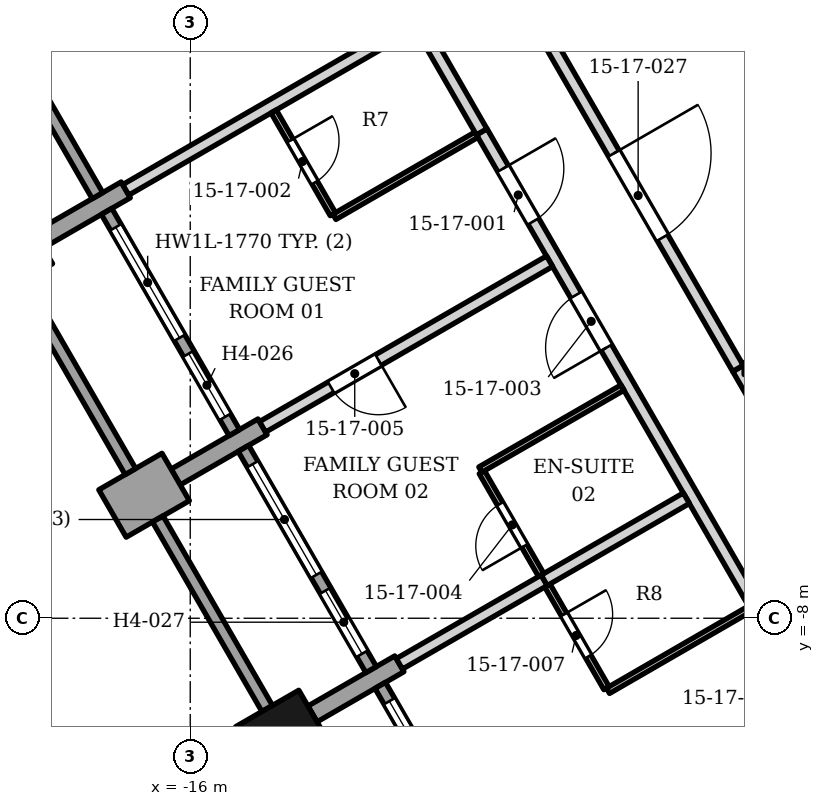
"""IFC4 building model, lengths in metres.
Left out: names, types, materials, properties, quantities, classifications, styles, units other than length and angle.
Written with IfcOpenShell. Run it as: python <this file> out.ifc"""

import sys

from ifc_helpers import new_model, si_unit, direction, frame, frame_2d, origin, origin_2d, place, context, subcontext, project, spatial, rectangle, extrude, element, fill, save


model = new_model("IFC4")
c1 = context("Model", 3, precision=1e-05, world=origin(), true_north=direction((0.0, 1.0)))
c2 = subcontext(c1, "Body", "Model", "MODEL_VIEW")
j1 = project(units=[si_unit("LENGTHUNIT", "METRE"), si_unit("PLANEANGLEUNIT", "RADIAN")], contexts=[c1])
p1 = place(None, origin())
s1 = spatial("IfcSite", under=j1, at=p1, CompositionType="ELEMENT")
p2 = place(p1, origin())
s2 = spatial("IfcBuilding", under=s1, at=p2, CompositionType="ELEMENT")
p3 = place(p2, frame((0.0, 0.0, 76.6)))
s3 = spatial("IfcBuildingStorey", under=s2, at=p3, CompositionType="ELEMENT", Elevation=76.6)
for number, where, z_axis, x_axis in (
    (1, (-19.009, -2.08, 0.0), (0.0, 0.0, 1.0), (0.5, -0.866, 0.0)),
    (2, (-14.509, -9.874, 0.0), (0.0, 0.0, 1.0), (0.5, -0.866, 0.0)),
):
    element("IfcColumn", number, at=place(p3, frame(where, z_axis=z_axis, x_axis=x_axis)), inside=s3, PredefinedType="COLUMN", context=c2, shape_type="SweptSolid", body=[
        extrude(rectangle(XDim=0.9, YDim=1.2, at=origin_2d()), origin(), (0.0, 0.0, 1.0), 3.4),
    ])
p4 = place(p3, frame((-18.49, -1.78, 0.0), z_axis=(0.0, 0.0, 1.0), x_axis=(0.866040211805, 0.499974350878, 0.0)))
e3 = element("IfcWall", 3, at=p4, inside=s3, PredefinedType="SOLIDWALL", context=c2, shape_type="SweptSolid", body=[
    extrude(rectangle(XDim=1.65, YDim=0.3, at=frame_2d((0.825, 0.0))), origin(), (0.0, 0.0, 1.0), 2.65),
])
p5 = place(p3, frame((-17.279, -6.277, 0.0), z_axis=(0.0, 0.0, 1.0), x_axis=(0.866094119867, 0.499880961361, 0.0)))
e4 = element("IfcWall", 4, at=p5, inside=s3, PredefinedType="SOLIDWALL", context=c2, shape_type="SweptSolid", body=[
    extrude(rectangle(XDim=1.2, YDim=0.9, at=frame_2d((0.6, 0.0))), origin(), (0.0, 0.0, 1.0), 2.63),
])
p6 = place(p3, frame((-16.24, -5.677, 0.0), z_axis=(0.0, 0.0, 1.0), x_axis=(0.866040211805, 0.499974350878, 0.0)))
e5 = element("IfcWall", 5, at=p6, inside=s3, PredefinedType="SOLIDWALL", context=c2, shape_type="SweptSolid", body=[
    extrude(rectangle(XDim=1.65, YDim=0.3, at=frame_2d((0.825, 0.0))), origin(), (0.0, 0.0, 1.0), 2.473),
])
p7 = place(p3, frame((-12.561, -8.749, 0.0), z_axis=(0.0, 0.0, 1.0), x_axis=(-0.866003217194, -0.500038426333, 0.0)))
e6 = element("IfcWall", 6, at=p7, inside=s3, PredefinedType="SOLIDWALL", context=c2, shape_type="SweptSolid", body=[
    extrude(rectangle(XDim=1.65, YDim=0.3, at=frame_2d((0.825, 0.0))), origin(), (0.0, 0.0, 1.0), 2.242),
])
p8 = place(p3, frame((-19.625, 2.587, 0.0), z_axis=(0.0, 0.0, 1.0), x_axis=(0.499958946799, -0.866049104564, 0.0)))
e7 = element("IfcWall", 7, at=p8, inside=s3, PredefinedType="ELEMENTEDWALL", context=c2, shape_type="SweptSolid", body=[
    extrude(rectangle(XDim=4.2, YDim=0.2, at=frame_2d((2.1, 0.0))), origin(), (0.0, 0.0, 1.0), 2.65),
])
p9 = place(p3, frame((-18.784, -2.47, 0.0), z_axis=(0.0, 0.0, 1.0), x_axis=(0.500012057535, -0.866018442252, 0.0)))
e8 = element("IfcWall", 8, at=p9, inside=s3, PredefinedType="SOLIDWALL", context=c2, shape_type="SweptSolid", body=[
    extrude(rectangle(XDim=3.6, YDim=0.2, at=frame_2d((1.8, 0.0))), origin(), (0.0, 0.0, 1.0), 2.63),
])
p10 = place(p3, frame((-17.375, -1.31, 0.0), z_axis=(0.0, 0.0, 1.0), x_axis=(0.49998411664, -0.866034573852, 0.0)))
e9 = element("IfcWall", 9, at=p10, inside=s3, PredefinedType="ELEMENTEDWALL", context=c2, shape_type="SweptSolid", body=[
    extrude(rectangle(XDim=4.2, YDim=0.2, at=frame_2d((2.1, 0.0))), origin(), (0.0, 0.0, 1.0), 2.473),
])
p11 = place(p10, frame((0.3, 0.0, 0.6)))
e10 = element("IfcOpeningElement", 10, at=p11, cuts=e9, PredefinedType="OPENING", context=c2, shape_type="SweptSolid", body=[
    extrude(rectangle(XDim=2.1, YDim=1.77, at=frame_2d((1.05, 0.885))), frame((0.0, 0.11, 0.0), z_axis=(0.0, -1.0, 0.0), x_axis=(1.0, 0.0, 0.0)), (0.0, 0.0, 1.0), 0.22),
])
p12 = place(p10, frame((2.7, 0.0, 0.0)))
e11 = element("IfcOpeningElement", 11, at=p12, cuts=e9, PredefinedType="OPENING", context=c2, shape_type="SweptSolid", body=[
    extrude(rectangle(XDim=1.2, YDim=2.37, at=frame_2d((0.6, 1.185))), frame((0.0, 0.11, 0.0), z_axis=(0.0, -1.0, 0.0), x_axis=(1.0, 0.0, 0.0)), (0.0, 0.0, 1.0), 0.22),
])
p13 = place(p3, frame((-16.534, -6.367, 0.0), z_axis=(0.0, 0.0, 1.0), x_axis=(0.500012057535, -0.866018442252, 0.0)))
e12 = element("IfcWall", 12, at=p13, inside=s3, PredefinedType="SOLIDWALL", context=c2, shape_type="SweptSolid", body=[
    extrude(rectangle(XDim=3.6, YDim=0.2, at=frame_2d((1.8, 0.0))), origin(), (0.0, 0.0, 1.0), 2.63),
])
p14 = place(p3, frame((-15.125, -5.207, 0.0), z_axis=(0.0, 0.0, 1.0), x_axis=(0.499958946799, -0.866049104564, 0.0)))
e13 = element("IfcWall", 13, at=p14, inside=s3, PredefinedType="ELEMENTEDWALL", context=c2, shape_type="SweptSolid", body=[
    extrude(rectangle(XDim=4.2, YDim=0.2, at=frame_2d((2.1, 0.0))), origin(), (0.0, 0.0, 1.0), 2.242),
])
p15 = place(p14, frame((0.3, 0.0, 0.6)))
e14 = element("IfcOpeningElement", 14, at=p15, cuts=e13, PredefinedType="OPENING", context=c2, shape_type="SweptSolid", body=[
    extrude(rectangle(XDim=2.1, YDim=1.54, at=frame_2d((1.05, 0.77))), frame((0.0, 0.11, 0.0), z_axis=(0.0, -1.0, 0.0), x_axis=(1.0, 0.0, 0.0)), (0.0, 0.0, 1.0), 0.22),
])
p16 = place(p14, frame((2.7, 0.0, 0.0)))
e15 = element("IfcOpeningElement", 15, at=p16, cuts=e13, PredefinedType="OPENING", context=c2, shape_type="SweptSolid", body=[
    extrude(rectangle(XDim=1.2, YDim=2.14, at=frame_2d((0.6, 1.07))), frame((0.0, 0.11, 0.0), z_axis=(0.0, -1.0, 0.0), x_axis=(1.0, 0.0, 0.0)), (0.0, 0.0, 1.0), 0.22),
])
p17 = place(p3, frame((-12.875, -9.104, 0.0), z_axis=(0.0, 0.0, 1.0), x_axis=(0.49998411664, -0.866034573852, 0.0)))
e16 = element("IfcWall", 16, at=p17, inside=s3, PredefinedType="ELEMENTEDWALL", context=c2, shape_type="SweptSolid", body=[
    extrude(rectangle(XDim=4.2, YDim=0.2, at=frame_2d((2.1, 0.0))), origin(), (0.0, 0.0, 1.0), 2.242),
])
p18 = place(p17, frame((0.3, 0.0, 0.6)))
e17 = element("IfcOpeningElement", 17, at=p18, cuts=e16, PredefinedType="OPENING", context=c2, shape_type="SweptSolid", body=[
    extrude(rectangle(XDim=2.1, YDim=1.54, at=frame_2d((1.05, 0.77))), frame((0.0, 0.11, 0.0), z_axis=(0.0, -1.0, 0.0), x_axis=(1.0, 0.0, 0.0)), (0.0, 0.0, 1.0), 0.22),
])
p19 = place(p17, frame((2.7, 0.0, 0.0)))
e18 = element("IfcOpeningElement", 18, at=p19, cuts=e16, PredefinedType="OPENING", context=c2, shape_type="SweptSolid", body=[
    extrude(rectangle(XDim=1.2, YDim=2.14, at=frame_2d((0.6, 1.07))), frame((0.0, 0.11, 0.0), z_axis=(0.0, -1.0, 0.0), x_axis=(1.0, 0.0, 0.0)), (0.0, 0.0, 1.0), 0.22),
])
p20 = place(p3, frame((-11.206, 0.0, 0.0), z_axis=(0.0, 0.0, 1.0), x_axis=(0.500002959525, -0.866023695095, 0.0)))
e19 = element("IfcWall", 19, at=p20, inside=s3, PredefinedType="PARTITIONING", context=c2, shape_type="SweptSolid", body=[
    extrude(rectangle(XDim=22.351, YDim=0.2, at=frame_2d((11.175, 0.0))), origin(), (0.0, 0.0, 1.0), 2.242),
])
p21 = place(p20, frame((0.7, 0.0, 0.0)))
e20 = element("IfcOpeningElement", 20, at=p21, cuts=e19, PredefinedType="OPENING", context=c2, shape_type="SweptSolid", body=[
    extrude(rectangle(XDim=1.0, YDim=2.1, at=frame_2d((0.5, 1.05))), frame((0.0, 0.11, 0.0), z_axis=(0.0, -1.0, 0.0), x_axis=(1.0, 0.0, 0.0)), (0.0, 0.0, 1.0), 0.22),
])
p22 = place(p20, frame((3.1, 0.0, 0.0)))
e21 = element("IfcOpeningElement", 21, at=p22, cuts=e19, PredefinedType="OPENING", context=c2, shape_type="SweptSolid", body=[
    extrude(rectangle(XDim=1.0, YDim=2.1, at=frame_2d((0.5, 1.05))), frame((0.0, 0.11, 0.0), z_axis=(0.0, -1.0, 0.0), x_axis=(1.0, 0.0, 0.0)), (0.0, 0.0, 1.0), 0.22),
])
p23 = place(p20, frame((9.7, 0.0, 0.0)))
e22 = element("IfcOpeningElement", 22, at=p23, cuts=e19, PredefinedType="OPENING", context=c2, shape_type="SweptSolid", body=[
    extrude(rectangle(XDim=1.0, YDim=2.1, at=frame_2d((0.5, 1.05))), frame((0.0, 0.11, 0.0), z_axis=(0.0, -1.0, 0.0), x_axis=(1.0, 0.0, 0.0)), (0.0, 0.0, 1.0), 0.22),
])
p24 = place(p20, frame((12.1, 0.0, 0.0)))
e23 = element("IfcOpeningElement", 23, at=p24, cuts=e19, PredefinedType="OPENING", context=c2, shape_type="SweptSolid", body=[
    extrude(rectangle(XDim=1.0, YDim=2.1, at=frame_2d((0.5, 1.05))), frame((0.0, 0.11, 0.0), z_axis=(0.0, -1.0, 0.0), x_axis=(1.0, 0.0, 0.0)), (0.0, 0.0, 1.0), 0.22),
])
p25 = place(p20, frame((16.4, 0.0, 0.0)))
e24 = element("IfcOpeningElement", 24, at=p25, cuts=e19, PredefinedType="OPENING", context=c2, shape_type="SweptSolid", body=[
    extrude(rectangle(XDim=1.1, YDim=2.1, at=frame_2d((0.55, 1.05))), frame((0.0, 0.11, 0.0), z_axis=(0.0, -1.0, 0.0), x_axis=(1.0, 0.0, 0.0)), (0.0, 0.0, 1.0), 0.22),
])
p26 = place(p20, frame((20.925, 0.0, 0.0)))
e25 = element("IfcOpeningElement", 25, at=p26, cuts=e19, PredefinedType="OPENING", context=c2, shape_type="SweptSolid", body=[
    extrude(rectangle(XDim=1.1, YDim=2.1, at=frame_2d((0.55, 1.05))), frame((0.0, 0.11, 0.0), z_axis=(0.0, -1.0, 0.0), x_axis=(1.0, 0.0, 0.0)), (0.0, 0.0, 1.0), 0.22),
])
p27 = place(p3, frame((-9.129, -9.193, 0.0), z_axis=(0.0, 0.0, 1.0), x_axis=(0.865671764241, 0.500612022024, 0.0)))
e26 = element("IfcWall", 26, at=p27, inside=s3, PredefinedType="PARTITIONING", context=c2, shape_type="SweptSolid", body=[
    extrude(rectangle(XDim=2.7, YDim=0.1, at=frame_2d((1.35, 0.0))), origin(), (0.0, 0.0, 1.0), 2.242),
])
p28 = place(p3, frame((-10.127, -7.46, 0.0), z_axis=(0.0, 0.0, 1.0), x_axis=(0.499223742716, -0.866473112514, 0.0)))
e27 = element("IfcWall", 27, at=p28, inside=s3, PredefinedType="PARTITIONING", context=c2, shape_type="SweptSolid", body=[
    extrude(rectangle(XDim=1.95, YDim=0.1, at=frame_2d((0.975, 0.0))), origin(), (0.0, 0.0, 1.0), 2.473),
])
p29 = place(p28, frame((0.55, 0.0, 0.0)))
e28 = element("IfcOpeningElement", 28, at=p29, cuts=e27, PredefinedType="OPENING", context=c2, shape_type="SweptSolid", body=[
    extrude(rectangle(XDim=0.8, YDim=2.1, at=frame_2d((0.4, 1.05))), frame((0.0, 0.06, 0.0), z_axis=(0.0, -1.0, 0.0), x_axis=(1.0, 0.0, 0.0)), (0.0, 0.0, 1.0), 0.12),
])
p30 = place(p3, frame((-12.561, -8.75, 0.0), z_axis=(0.0, 0.0, 1.0), x_axis=(0.866362904174, 0.499414976018, 0.0)))
e29 = element("IfcWall", 29, at=p30, inside=s3, PredefinedType="PARTITIONING", context=c2, shape_type="SweptSolid", body=[
    extrude(rectangle(XDim=2.75, YDim=0.2, at=frame_2d((1.375, 0.0))), origin(), (0.0, 0.0, 1.0), 2.242),
])
p31 = place(p3, frame((-10.178, -7.376, 0.0), z_axis=(0.0, 0.0, 1.0), x_axis=(0.866036505625, 0.499980770555, 0.0)))
e30 = element("IfcWall", 30, at=p31, inside=s3, PredefinedType="PARTITIONING", context=c2, shape_type="SweptSolid", body=[
    extrude(rectangle(XDim=2.7, YDim=0.2, at=frame_2d((1.35, 0.0))), origin(), (0.0, 0.0, 1.0), 2.473),
])
p32 = place(p3, frame((-11.204, -5.599, 0.0), z_axis=(0.0, 0.0, 1.0), x_axis=(0.500098182527, -0.865968710655, 0.0)))
e31 = element("IfcWall", 31, at=p32, inside=s3, PredefinedType="PARTITIONING", context=c2, shape_type="SweptSolid", body=[
    extrude(rectangle(XDim=1.95, YDim=0.1, at=frame_2d((0.975, 0.0))), origin(), (0.0, 0.0, 1.0), 2.242),
])
p33 = place(p32, frame((0.6, 0.0, 0.0)))
e32 = element("IfcOpeningElement", 32, at=p33, cuts=e31, PredefinedType="OPENING", context=c2, shape_type="SweptSolid", body=[
    extrude(rectangle(XDim=0.8, YDim=2.1, at=frame_2d((0.4, 1.05))), frame((0.0, 0.06, 0.0), z_axis=(0.0, -1.0, 0.0), x_axis=(1.0, 0.0, 0.0)), (0.0, 0.0, 1.0), 0.12),
])
p34 = place(p3, frame((-11.229, -5.556, 0.0), z_axis=(0.0, 0.0, 1.0), x_axis=(0.866339109022, 0.499456252518, 0.0)))
e33 = element("IfcWall", 33, at=p34, inside=s3, PredefinedType="PARTITIONING", context=c2, shape_type="SweptSolid", body=[
    extrude(rectangle(XDim=2.7, YDim=0.1, at=frame_2d((1.35, 0.0))), origin(), (0.0, 0.0, 1.0), 2.242),
])
p35 = place(p3, frame((-6.991, -3.893, 0.0), z_axis=(0.0, 0.0, 1.0), x_axis=(0.499865112403, -0.86610326717, 0.0)))
e34 = element("IfcWall", 34, at=p35, inside=s3, PredefinedType="PARTITIONING", context=c2, shape_type="SweptSolid", body=[
    extrude(rectangle(XDim=13.827, YDim=0.2, at=frame_2d((6.914, 0.0))), origin(), (0.0, 0.0, 1.0), 2.242),
])
p36 = place(p35, frame((5.377, 0.0, 0.0)))
e35 = element("IfcOpeningElement", 35, at=p36, cuts=e34, PredefinedType="OPENING", context=c2, shape_type="SweptSolid", body=[
    extrude(rectangle(XDim=0.9, YDim=2.1, at=frame_2d((0.45, 1.05))), frame((0.0, 0.11, 0.0), z_axis=(0.0, -1.0, 0.0), x_axis=(1.0, 0.0, 0.0)), (0.0, 0.0, 1.0), 0.22),
])
p37 = place(p3, frame((-14.811, -4.852, 0.0), z_axis=(0.0, 0.0, 1.0), x_axis=(0.866193043817, 0.499709526468, 0.0)))
e36 = element("IfcWall", 36, at=p37, inside=s3, PredefinedType="PARTITIONING", context=c2, shape_type="SweptSolid", body=[
    extrude(rectangle(XDim=5.45, YDim=0.2, at=frame_2d((2.725, 0.0))), origin(), (0.0, 0.0, 1.0), 2.242),
])
p38 = place(p37, frame((1.3, 0.0, 0.0)))
e37 = element("IfcOpeningElement", 37, at=p38, cuts=e36, PredefinedType="OPENING", context=c2, shape_type="SweptSolid", body=[
    extrude(rectangle(XDim=0.9, YDim=2.1, at=frame_2d((0.45, 1.05))), frame((0.0, 0.11, 0.0), z_axis=(0.0, -1.0, 0.0), x_axis=(1.0, 0.0, 0.0)), (0.0, 0.0, 1.0), 0.22),
])
p39 = place(p3, frame((-13.629, -1.399, 0.0), z_axis=(0.0, 0.0, 1.0), x_axis=(0.86571095196, 0.500544251447, 0.0)))
e38 = element("IfcWall", 38, at=p39, inside=s3, PredefinedType="PARTITIONING", context=c2, shape_type="SweptSolid", body=[
    extrude(rectangle(XDim=2.7, YDim=0.1, at=frame_2d((1.35, 0.0))), origin(), (0.0, 0.0, 1.0), 2.242),
])
p40 = place(p3, frame((-17.061, -0.955, 0.0), z_axis=(0.0, 0.0, 1.0), x_axis=(0.866031107881, 0.499990120084, 0.0)))
e39 = element("IfcWall", 39, at=p40, inside=s3, PredefinedType="PARTITIONING", context=c2, shape_type="SweptSolid", body=[
    extrude(rectangle(XDim=5.448, YDim=0.2, at=frame_2d((2.724, 0.0))), origin(), (0.0, 0.0, 1.0), 2.242),
])
p41 = place(p3, frame((-13.34, 3.699, 0.0), z_axis=(0.0, 0.0, 1.0), x_axis=(0.499410635897, -0.866365406023, 0.0)))
e40 = element("IfcWall", 40, at=p41, inside=s3, PredefinedType="PARTITIONING", context=c2, shape_type="SweptSolid", body=[
    extrude(rectangle(XDim=4.271, YDim=0.2, at=frame_2d((2.135, 0.0))), origin(), (0.0, 0.0, 1.0), 2.242),
])
p42 = place(p3, frame((-14.628, 0.334, 0.0), z_axis=(0.0, 0.0, 1.0), x_axis=(0.499317740681, -0.866418948224, 0.0)))
e41 = element("IfcWall", 41, at=p42, inside=s3, PredefinedType="PARTITIONING", context=c2, shape_type="SweptSolid", body=[
    extrude(rectangle(XDim=1.95, YDim=0.1, at=frame_2d((0.975, 0.0))), origin(), (0.0, 0.0, 1.0), 2.242),
])
p43 = place(p42, frame((0.55, 0.0, 0.0)))
e42 = element("IfcOpeningElement", 42, at=p43, cuts=e41, PredefinedType="OPENING", context=c2, shape_type="SweptSolid", body=[
    extrude(rectangle(XDim=0.8, YDim=2.1, at=frame_2d((0.4, 1.05))), frame((0.0, 0.06, 0.0), z_axis=(0.0, -1.0, 0.0), x_axis=(1.0, 0.0, 0.0)), (0.0, 0.0, 1.0), 0.12),
])
p44 = place(p3, frame((-11.376, 3.7, 0.0), z_axis=(0.0, 0.0, 1.0), x_axis=(0.500182929981, -0.865919763347, 0.0)))
e43 = element("IfcWall", 43, at=p44, inside=s3, PredefinedType="PARTITIONING", context=c2, shape_type="SweptSolid", body=[
    extrude(rectangle(XDim=8.765, YDim=0.2, at=frame_2d((4.383, 0.0))), origin(), (0.0, 0.0, 1.0), 2.242),
])
p45 = place(p44, frame((4.683, 0.0, 0.0)))
e44 = element("IfcOpeningElement", 44, at=p45, cuts=e43, PredefinedType="OPENING", context=c2, shape_type="SweptSolid", body=[
    extrude(rectangle(XDim=1.6, YDim=2.1, at=frame_2d((0.8, 1.05))), frame((0.0, 0.11, 0.0), z_axis=(0.0, -1.0, 0.0), x_axis=(1.0, 0.0, 0.0)), (0.0, 0.0, 1.0), 0.22),
])
p46 = place(p11, origin())
e45 = element("IfcWindow", 45, at=p46, inside=s3, PartitioningType="SINGLE_PANEL", PredefinedType="WINDOW", context=c2, shape_type="SweptSolid", body=[
    extrude(rectangle(XDim=2.1, YDim=1.77, at=frame_2d((1.05, 0.885))), frame((0.0, 0.03, 0.0), z_axis=(0.0, -1.0, 0.0), x_axis=(1.0, 0.0, 0.0)), (0.0, 0.0, 1.0), 0.06),
])
fill(e10, e45)
p47 = place(p12, origin())
e46 = element("IfcDoor", 46, at=p47, inside=s3, OperationType="SINGLE_SWING_LEFT", PredefinedType="DOOR", context=c2, shape_type="SweptSolid", body=[
    extrude(rectangle(XDim=1.2, YDim=2.37, at=frame_2d((0.6, 1.185))), frame((0.0, 0.025, 0.0), z_axis=(0.0, -1.0, 0.0), x_axis=(1.0, 0.0, 0.0)), (0.0, 0.0, 1.0), 0.05),
])
fill(e11, e46)
p48 = place(p15, origin())
e47 = element("IfcWindow", 47, at=p48, inside=s3, PartitioningType="SINGLE_PANEL", PredefinedType="WINDOW", context=c2, shape_type="SweptSolid", body=[
    extrude(rectangle(XDim=2.1, YDim=1.54, at=frame_2d((1.05, 0.77))), frame((0.0, 0.03, 0.0), z_axis=(0.0, -1.0, 0.0), x_axis=(1.0, 0.0, 0.0)), (0.0, 0.0, 1.0), 0.06),
])
fill(e14, e47)
p49 = place(p16, origin())
e48 = element("IfcDoor", 48, at=p49, inside=s3, OperationType="SINGLE_SWING_LEFT", PredefinedType="DOOR", context=c2, shape_type="SweptSolid", body=[
    extrude(rectangle(XDim=1.2, YDim=2.14, at=frame_2d((0.6, 1.07))), frame((0.0, 0.025, 0.0), z_axis=(0.0, -1.0, 0.0), x_axis=(1.0, 0.0, 0.0)), (0.0, 0.0, 1.0), 0.05),
])
fill(e15, e48)
p50 = place(p18, origin())
e49 = element("IfcWindow", 49, at=p50, inside=s3, PartitioningType="SINGLE_PANEL", PredefinedType="WINDOW", context=c2, shape_type="SweptSolid", body=[
    extrude(rectangle(XDim=2.1, YDim=1.54, at=frame_2d((1.05, 0.77))), frame((0.0, 0.03, 0.0), z_axis=(0.0, -1.0, 0.0), x_axis=(1.0, 0.0, 0.0)), (0.0, 0.0, 1.0), 0.06),
])
fill(e17, e49)
p51 = place(p21, origin())
e50 = element("IfcDoor", 50, at=p51, inside=s3, OperationType="SINGLE_SWING_LEFT", PredefinedType="DOOR", context=c2, shape_type="SweptSolid", body=[
    extrude(rectangle(XDim=1.0, YDim=2.1, at=frame_2d((0.5, 1.05))), frame((0.0, 0.025, 0.0), z_axis=(0.0, -1.0, 0.0), x_axis=(1.0, 0.0, 0.0)), (0.0, 0.0, 1.0), 0.05),
])
fill(e20, e50)
p52 = place(p43, origin())
e51 = element("IfcDoor", 51, at=p52, inside=s3, OperationType="SINGLE_SWING_LEFT", PredefinedType="DOOR", context=c2, shape_type="SweptSolid", body=[
    extrude(rectangle(XDim=0.8, YDim=2.1, at=frame_2d((0.4, 1.05))), frame((0.0, 0.025, 0.0), z_axis=(0.0, -1.0, 0.0), x_axis=(1.0, 0.0, 0.0)), (0.0, 0.0, 1.0), 0.05),
])
fill(e42, e51)
p53 = place(p22, origin())
e52 = element("IfcDoor", 52, at=p53, inside=s3, OperationType="SINGLE_SWING_RIGHT", PredefinedType="DOOR", context=c2, shape_type="SweptSolid", body=[
    extrude(rectangle(XDim=1.0, YDim=2.1, at=frame_2d((0.5, 1.05))), frame((0.0, 0.025, 0.0), z_axis=(0.0, -1.0, 0.0), x_axis=(1.0, 0.0, 0.0)), (0.0, 0.0, 1.0), 0.05),
])
fill(e21, e52)
p54 = place(p33, origin())
e53 = element("IfcDoor", 53, at=p54, inside=s3, OperationType="SINGLE_SWING_RIGHT", PredefinedType="DOOR", context=c2, shape_type="SweptSolid", body=[
    extrude(rectangle(XDim=0.8, YDim=2.1, at=frame_2d((0.4, 1.05))), frame((0.0, 0.025, 0.0), z_axis=(0.0, -1.0, 0.0), x_axis=(1.0, 0.0, 0.0)), (0.0, 0.0, 1.0), 0.05),
])
fill(e32, e53)
p55 = place(p38, origin())
e54 = element("IfcDoor", 54, at=p55, inside=s3, OperationType="SINGLE_SWING_RIGHT", PredefinedType="DOOR", context=c2, shape_type="SweptSolid", body=[
    extrude(rectangle(XDim=0.9, YDim=2.1, at=frame_2d((0.45, 1.05))), frame((0.0, 0.025, 0.0), z_axis=(0.0, -1.0, 0.0), x_axis=(1.0, 0.0, 0.0)), (0.0, 0.0, 1.0), 0.05),
])
fill(e37, e54)
p56 = place(p29, origin())
e55 = element("IfcDoor", 55, at=p56, inside=s3, OperationType="SINGLE_SWING_LEFT", PredefinedType="DOOR", context=c2, shape_type="SweptSolid", body=[
    extrude(rectangle(XDim=0.8, YDim=2.1, at=frame_2d((0.4, 1.05))), frame((0.0, 0.025, 0.0), z_axis=(0.0, -1.0, 0.0), x_axis=(1.0, 0.0, 0.0)), (0.0, 0.0, 1.0), 0.05),
])
fill(e28, e55)
p57 = place(p45, origin())
e56 = element("IfcDoor", 56, at=p57, inside=s3, OperationType="DOUBLE_DOOR_SINGLE_SWING", PredefinedType="DOOR", context=c2, shape_type="SweptSolid", body=[
    extrude(rectangle(XDim=1.6, YDim=2.1, at=frame_2d((0.8, 1.05))), frame((0.0, 0.025, 0.0), z_axis=(0.0, -1.0, 0.0), x_axis=(1.0, 0.0, 0.0)), (0.0, 0.0, 1.0), 0.05),
])
fill(e44, e56)
save(model, sys.argv[1])
